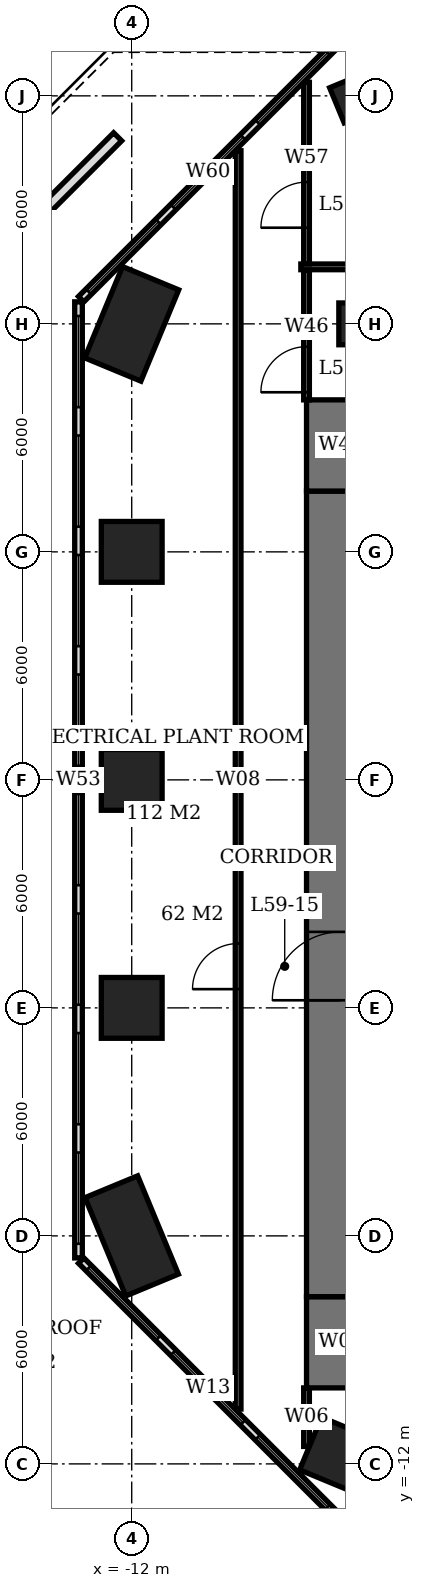
"""IFC4 building model, lengths in metres.
Left out: names, types, materials, properties, quantities, classifications, styles, units other than length and angle.
Written with IfcOpenShell. Run it as: python <this file> out.ifc"""

import sys

from ifc_helpers import new_model, si_unit, direction, frame, frame_2d, origin, origin_2d, place, context, subcontext, project, spatial, rectangle, extrude, element, fill, save


model = new_model("IFC4")
c1 = context("Model", 3, precision=1e-05, world=origin(), true_north=direction((0.0, 1.0)))
c2 = subcontext(c1, "Body", "Model", "MODEL_VIEW")
j1 = project(units=[si_unit("LENGTHUNIT", "METRE"), si_unit("PLANEANGLEUNIT", "RADIAN")], contexts=[c1])
p1 = place(None, origin())
s1 = spatial("IfcSite", under=j1, at=p1, CompositionType="ELEMENT")
p2 = place(p1, origin())
s2 = spatial("IfcBuilding", under=s1, at=p2, CompositionType="ELEMENT")
p3 = place(p2, frame((0.0, 0.0, 239.6)))
s3 = spatial("IfcBuildingStorey", under=s2, at=p3, CompositionType="ELEMENT", Elevation=239.6)
p4 = place(p3, frame((-12.0, -6.0, 0.0), z_axis=(0.0, 0.0, 1.0), x_axis=(-0.382683432365, 0.923879532511, 0.0)))
e1 = element("IfcColumn", 1, at=p4, inside=s3, PredefinedType="COLUMN", context=c2, shape_type="SweptSolid", body=[
    extrude(rectangle(XDim=2.8, YDim=1.5, at=origin_2d()), origin(), (0.0, 0.0, 1.0), 5.4),
])
for number, where, z_axis, x_axis in (
    (2, (-12.0, 0.0, 0.0), (0.0, 0.0, 1.0), (1.0, 0.0, 0.0)),
    (3, (-12.0, 6.0, 0.0), (0.0, 0.0, 1.0), (1.0, 0.0, 0.0)),
    (4, (-12.0, 12.0, 0.0), (0.0, 0.0, 1.0), (1.0, 0.0, 0.0)),
):
    element("IfcColumn", number, at=place(p3, frame(where, z_axis=z_axis, x_axis=x_axis)), inside=s3, PredefinedType="COLUMN", context=c2, shape_type="SweptSolid", body=[
        extrude(rectangle(XDim=1.6, YDim=1.6, at=origin_2d()), origin(), (0.0, 0.0, 1.0), 5.4),
    ])
p5 = place(p3, frame((-12.0, 18.0, 0.0), z_axis=(0.0, 0.0, 1.0), x_axis=(0.382683432365, 0.923879532511, 0.0)))
e5 = element("IfcColumn", 5, at=p5, inside=s3, PredefinedType="COLUMN", context=c2, shape_type="SweptSolid", body=[
    extrude(rectangle(XDim=2.6, YDim=1.6, at=origin_2d()), origin(), (0.0, 0.0, 1.0), 5.4),
])
p6 = place(p3, frame((-6.0, -12.0, 0.0), z_axis=(0.0, 0.0, 1.0), x_axis=(-0.923879532511, 0.382683432365, 0.0)))
e6 = element("IfcColumn", 6, at=p6, inside=s3, PredefinedType="COLUMN", context=c2, shape_type="SweptSolid", body=[
    extrude(rectangle(XDim=2.8, YDim=1.5, at=origin_2d()), origin(), (0.0, 0.0, 1.0), 5.4),
])
p7 = place(p3, frame((-6.0, 18.0, 0.0), z_axis=(0.0, 0.0, 1.0), x_axis=(1.0, 0.0, 0.0)))
e7 = element("IfcColumn", 7, at=p7, inside=s3, PredefinedType="COLUMN", context=c2, shape_type="SweptSolid", body=[
    extrude(rectangle(XDim=1.1, YDim=1.1, at=origin_2d()), origin(), (0.0, 0.0, 1.0), 5.4),
])
p8 = place(p3, frame((-6.0, 24.0, 0.0), z_axis=(0.0, 0.0, 1.0), x_axis=(0.923879532511, 0.382683432365, 0.0)))
e8 = element("IfcColumn", 8, at=p8, inside=s3, PredefinedType="COLUMN", context=c2, shape_type="SweptSolid", body=[
    extrude(rectangle(XDim=1.3, YDim=1.0, at=origin_2d()), origin(), (0.0, 0.0, 1.0), 5.4),
])
p9 = place(p3, frame((-6.5, -7.6, 0.0), z_axis=(0.0, 0.0, 1.0), x_axis=(0.0, 1.0, 0.0)))
e9 = element("IfcWall", 9, at=p9, inside=s3, PredefinedType="SHEAR", context=c2, shape_type="SweptSolid", body=[
    extrude(rectangle(XDim=21.2, YDim=1.8, at=frame_2d((10.6, 0.0))), origin(), (0.0, 0.0, 1.0), 5.4),
])
p10 = place(p9, frame((7.8, 0.0, 0.0)))
e10 = element("IfcOpeningElement", 10, at=p10, cuts=e9, PredefinedType="OPENING", context=c2, shape_type="SweptSolid", body=[
    extrude(rectangle(XDim=1.8, YDim=2.4, at=frame_2d((0.9, 1.2))), frame((0.0, 0.91, 0.0), z_axis=(0.0, -1.0, 0.0), x_axis=(1.0, 0.0, 0.0)), (0.0, 0.0, 1.0), 1.82),
])
for number, where, z_axis, x_axis in (
    (11, (-6.5, -10.0, 0.0), (0.0, 0.0, 1.0), (0.0, 1.0, 0.0)),
    (12, (-6.5, 13.6, 0.0), (0.0, 0.0, 1.0), (0.0, 1.0, 0.0)),
):
    element("IfcWall", number, at=place(p3, frame(where, z_axis=z_axis, x_axis=x_axis)), inside=s3, PredefinedType="SHEAR", context=c2, shape_type="SweptSolid", body=[
        extrude(rectangle(XDim=2.4, YDim=1.8, at=frame_2d((1.2, 0.0))), origin(), (0.0, 0.0, 1.0), 5.4),
    ])
p11 = place(p3, frame((-6.651, 25.329, 0.0), z_axis=(0.0, 0.0, 1.0), x_axis=(-0.707106781187, -0.707106781187, 0.0)))
e13 = element("IfcWall", 13, at=p11, inside=s3, PredefinedType="USERDEFINED", context=c2, shape_type="SweptSolid", body=[
    extrude(rectangle(XDim=9.445, YDim=0.2, at=frame_2d((4.723, 0.0))), origin(), (0.0, 0.0, 1.0), 5.4),
])
p12 = place(p11, frame((0.274, 0.0, 0.6)))
e14 = element("IfcOpeningElement", 14, at=p12, cuts=e13, PredefinedType="OPENING", context=c2, shape_type="SweptSolid", body=[
    extrude(rectangle(XDim=2.6, YDim=3.0, at=frame_2d((1.3, 1.5))), frame((0.0, 0.11, 0.0), z_axis=(0.0, -1.0, 0.0), x_axis=(1.0, 0.0, 0.0)), (0.0, 0.0, 1.0), 0.22),
])
p13 = place(p11, frame((3.423, 0.0, 0.6)))
e15 = element("IfcOpeningElement", 15, at=p13, cuts=e13, PredefinedType="OPENING", context=c2, shape_type="SweptSolid", body=[
    extrude(rectangle(XDim=2.6, YDim=3.0, at=frame_2d((1.3, 1.5))), frame((0.0, 0.11, 0.0), z_axis=(0.0, -1.0, 0.0), x_axis=(1.0, 0.0, 0.0)), (0.0, 0.0, 1.0), 0.22),
])
p14 = place(p11, frame((6.571, 0.0, 0.6)))
e16 = element("IfcOpeningElement", 16, at=p14, cuts=e13, PredefinedType="OPENING", context=c2, shape_type="SweptSolid", body=[
    extrude(rectangle(XDim=2.6, YDim=3.0, at=frame_2d((1.3, 1.5))), frame((0.0, 0.11, 0.0), z_axis=(0.0, -1.0, 0.0), x_axis=(1.0, 0.0, 0.0)), (0.0, 0.0, 1.0), 0.22),
])
p15 = place(p3, frame((-13.4, 18.58, 0.0), z_axis=(0.0, 0.0, 1.0), x_axis=(0.0, -1.0, 0.0)))
e17 = element("IfcWall", 17, at=p15, inside=s3, PredefinedType="USERDEFINED", context=c2, shape_type="SweptSolid", body=[
    extrude(rectangle(XDim=25.16, YDim=0.2, at=frame_2d((12.58, 0.0))), origin(), (0.0, 0.0, 1.0), 5.4),
])
p16 = place(p15, frame((0.373, 0.0, 0.6)))
e18 = element("IfcOpeningElement", 18, at=p16, cuts=e17, PredefinedType="OPENING", context=c2, shape_type="SweptSolid", body=[
    extrude(rectangle(XDim=2.4, YDim=3.0, at=frame_2d((1.2, 1.5))), frame((0.0, 0.11, 0.0), z_axis=(0.0, -1.0, 0.0), x_axis=(1.0, 0.0, 0.0)), (0.0, 0.0, 1.0), 0.22),
])
p17 = place(p15, frame((3.518, 0.0, 0.6)))
e19 = element("IfcOpeningElement", 19, at=p17, cuts=e17, PredefinedType="OPENING", context=c2, shape_type="SweptSolid", body=[
    extrude(rectangle(XDim=2.4, YDim=3.0, at=frame_2d((1.2, 1.5))), frame((0.0, 0.11, 0.0), z_axis=(0.0, -1.0, 0.0), x_axis=(1.0, 0.0, 0.0)), (0.0, 0.0, 1.0), 0.22),
])
p18 = place(p15, frame((6.662, 0.0, 0.6)))
e20 = element("IfcOpeningElement", 20, at=p18, cuts=e17, PredefinedType="OPENING", context=c2, shape_type="SweptSolid", body=[
    extrude(rectangle(XDim=2.4, YDim=3.0, at=frame_2d((1.2, 1.5))), frame((0.0, 0.11, 0.0), z_axis=(0.0, -1.0, 0.0), x_axis=(1.0, 0.0, 0.0)), (0.0, 0.0, 1.0), 0.22),
])
p19 = place(p15, frame((9.807, 0.0, 0.6)))
e21 = element("IfcOpeningElement", 21, at=p19, cuts=e17, PredefinedType="OPENING", context=c2, shape_type="SweptSolid", body=[
    extrude(rectangle(XDim=2.4, YDim=3.0, at=frame_2d((1.2, 1.5))), frame((0.0, 0.11, 0.0), z_axis=(0.0, -1.0, 0.0), x_axis=(1.0, 0.0, 0.0)), (0.0, 0.0, 1.0), 0.22),
])
p20 = place(p15, frame((12.952, 0.0, 0.6)))
e22 = element("IfcOpeningElement", 22, at=p20, cuts=e17, PredefinedType="OPENING", context=c2, shape_type="SweptSolid", body=[
    extrude(rectangle(XDim=2.4, YDim=3.0, at=frame_2d((1.2, 1.5))), frame((0.0, 0.11, 0.0), z_axis=(0.0, -1.0, 0.0), x_axis=(1.0, 0.0, 0.0)), (0.0, 0.0, 1.0), 0.22),
])
p21 = place(p15, frame((16.097, 0.0, 0.6)))
e23 = element("IfcOpeningElement", 23, at=p21, cuts=e17, PredefinedType="OPENING", context=c2, shape_type="SweptSolid", body=[
    extrude(rectangle(XDim=2.4, YDim=3.0, at=frame_2d((1.2, 1.5))), frame((0.0, 0.11, 0.0), z_axis=(0.0, -1.0, 0.0), x_axis=(1.0, 0.0, 0.0)), (0.0, 0.0, 1.0), 0.22),
])
p22 = place(p15, frame((19.242, 0.0, 0.6)))
e24 = element("IfcOpeningElement", 24, at=p22, cuts=e17, PredefinedType="OPENING", context=c2, shape_type="SweptSolid", body=[
    extrude(rectangle(XDim=2.4, YDim=3.0, at=frame_2d((1.2, 1.5))), frame((0.0, 0.11, 0.0), z_axis=(0.0, -1.0, 0.0), x_axis=(1.0, 0.0, 0.0)), (0.0, 0.0, 1.0), 0.22),
])
p23 = place(p15, frame((22.387, 0.0, 0.6)))
e25 = element("IfcOpeningElement", 25, at=p23, cuts=e17, PredefinedType="OPENING", context=c2, shape_type="SweptSolid", body=[
    extrude(rectangle(XDim=2.4, YDim=3.0, at=frame_2d((1.2, 1.5))), frame((0.0, 0.11, 0.0), z_axis=(0.0, -1.0, 0.0), x_axis=(1.0, 0.0, 0.0)), (0.0, 0.0, 1.0), 0.22),
])
p24 = place(p3, frame((-13.329, -6.651, 0.0), z_axis=(0.0, 0.0, 1.0), x_axis=(0.707106781187, -0.707106781187, 0.0)))
e26 = element("IfcWall", 26, at=p24, inside=s3, PredefinedType="USERDEFINED", context=c2, shape_type="SweptSolid", body=[
    extrude(rectangle(XDim=9.445, YDim=0.2, at=frame_2d((4.723, 0.0))), origin(), (0.0, 0.0, 1.0), 5.4),
])
p25 = place(p24, frame((0.274, 0.0, 0.6)))
e27 = element("IfcOpeningElement", 27, at=p25, cuts=e26, PredefinedType="OPENING", context=c2, shape_type="SweptSolid", body=[
    extrude(rectangle(XDim=2.6, YDim=3.0, at=frame_2d((1.3, 1.5))), frame((0.0, 0.11, 0.0), z_axis=(0.0, -1.0, 0.0), x_axis=(1.0, 0.0, 0.0)), (0.0, 0.0, 1.0), 0.22),
])
p26 = place(p24, frame((3.423, 0.0, 0.6)))
e28 = element("IfcOpeningElement", 28, at=p26, cuts=e26, PredefinedType="OPENING", context=c2, shape_type="SweptSolid", body=[
    extrude(rectangle(XDim=2.6, YDim=3.0, at=frame_2d((1.3, 1.5))), frame((0.0, 0.11, 0.0), z_axis=(0.0, -1.0, 0.0), x_axis=(1.0, 0.0, 0.0)), (0.0, 0.0, 1.0), 0.22),
])
p27 = place(p24, frame((6.571, 0.0, 0.6)))
e29 = element("IfcOpeningElement", 29, at=p27, cuts=e26, PredefinedType="OPENING", context=c2, shape_type="SweptSolid", body=[
    extrude(rectangle(XDim=2.6, YDim=3.0, at=frame_2d((1.3, 1.5))), frame((0.0, 0.11, 0.0), z_axis=(0.0, -1.0, 0.0), x_axis=(1.0, 0.0, 0.0)), (0.0, 0.0, 1.0), 0.22),
])
for number, where, z_axis, x_axis in (
    (30, (-12.37, -16.923, 0.0), (0.0, 0.0, 1.0), (-0.707, 0.707, 0.0)),
    (31, (-16.923, 18.37, 0.0), (0.0, 0.0, 1.0), (0.707, 0.707, 0.0)),
):
    element("IfcWall", number, at=place(p3, frame(where, z_axis=z_axis, x_axis=x_axis)), inside=s3, PredefinedType="USERDEFINED", context=c2, shape_type="SweptSolid", body=[
        extrude(rectangle(XDim=6.438, YDim=0.3, at=frame_2d((3.219, 0.0))), origin(), (0.0, 0.0, 1.0), 0.6),
    ])
p28 = place(p3, frame((-9.2, -10.556, 0.0), z_axis=(0.0, 0.0, 1.0), x_axis=(0.0, 1.0, 0.0)))
e32 = element("IfcWall", 32, at=p28, inside=s3, PredefinedType="PARTITIONING", context=c2, shape_type="SweptSolid", body=[
    extrude(rectangle(XDim=33.112, YDim=0.15, at=frame_2d((16.556, 0.0))), origin(), (0.0, 0.0, 1.0), 5.15),
])
p29 = place(p28, frame((11.049, 0.0, 0.0)))
e33 = element("IfcOpeningElement", 33, at=p29, cuts=e32, PredefinedType="OPENING", context=c2, shape_type="SweptSolid", body=[
    extrude(rectangle(XDim=1.2, YDim=2.4, at=frame_2d((0.6, 1.2))), frame((0.0, 0.085, 0.0), z_axis=(0.0, -1.0, 0.0), x_axis=(1.0, 0.0, 0.0)), (0.0, 0.0, 1.0), 0.17),
])
p30 = place(p3, frame((-7.4, -11.541, 0.0), z_axis=(0.0, 0.0, 1.0), x_axis=(0.0, 1.0, 0.0)))
e34 = element("IfcWall", 34, at=p30, inside=s3, PredefinedType="PARTITIONING", context=c2, shape_type="SweptSolid", body=[
    extrude(rectangle(XDim=1.541, YDim=0.15, at=frame_2d((0.77, 0.0))), origin(), (0.0, 0.0, 1.0), 5.15),
])
p31 = place(p3, frame((-7.4, 16.0, 0.0), z_axis=(0.0, 0.0, 1.0), x_axis=(0.0, 1.0, 0.0)))
e35 = element("IfcWall", 35, at=p31, inside=s3, PredefinedType="PARTITIONING", context=c2, shape_type="SweptSolid", body=[
    extrude(rectangle(XDim=3.425, YDim=0.15, at=frame_2d((1.712, 0.0))), origin(), (0.0, 0.0, 1.0), 5.15),
])
p32 = place(p31, frame((0.2, 0.0, 0.0)))
e36 = element("IfcOpeningElement", 36, at=p32, cuts=e35, PredefinedType="OPENING", context=c2, shape_type="SweptSolid", body=[
    extrude(rectangle(XDim=1.2, YDim=2.4, at=frame_2d((0.6, 1.2))), frame((0.0, 0.085, 0.0), z_axis=(0.0, -1.0, 0.0), x_axis=(1.0, 0.0, 0.0)), (0.0, 0.0, 1.0), 0.17),
])
p33 = place(p3, frame((-7.4, 19.575, 0.0), z_axis=(0.0, 0.0, 1.0), x_axis=(0.0, 1.0, 0.0)))
e37 = element("IfcWall", 37, at=p33, inside=s3, PredefinedType="PARTITIONING", context=c2, shape_type="SweptSolid", body=[
    extrude(rectangle(XDim=4.781, YDim=0.15, at=frame_2d((2.391, 0.0))), origin(), (0.0, 0.0, 1.0), 5.15),
])
p34 = place(p33, frame((0.955, 0.0, 0.0)))
e38 = element("IfcOpeningElement", 38, at=p34, cuts=e37, PredefinedType="OPENING", context=c2, shape_type="SweptSolid", body=[
    extrude(rectangle(XDim=1.2, YDim=2.4, at=frame_2d((0.6, 1.2))), frame((0.0, 0.085, 0.0), z_axis=(0.0, -1.0, 0.0), x_axis=(1.0, 0.0, 0.0)), (0.0, 0.0, 1.0), 0.17),
])
p35 = place(p3, frame((-7.55, 19.5, 0.0), z_axis=(0.0, 0.0, 1.0), x_axis=(1.0, 0.0, 0.0)))
e39 = element("IfcWall", 39, at=p35, inside=s3, PredefinedType="PARTITIONING", context=c2, shape_type="SweptSolid", body=[
    extrude(rectangle(XDim=12.05, YDim=0.15, at=frame_2d((6.025, 0.0))), origin(), (0.0, 0.0, 1.0), 5.15),
])
p36 = place(p12, origin())
e40 = element("IfcWindow", 40, at=p36, inside=s3, PartitioningType="SINGLE_PANEL", PredefinedType="USERDEFINED", context=c2, shape_type="SweptSolid", body=[
    extrude(rectangle(XDim=2.6, YDim=3.0, at=frame_2d((1.3, 1.5))), frame((0.0, 0.03, 0.0), z_axis=(0.0, -1.0, 0.0), x_axis=(1.0, 0.0, 0.0)), (0.0, 0.0, 1.0), 0.06),
])
fill(e14, e40)
p37 = place(p13, origin())
e41 = element("IfcWindow", 41, at=p37, inside=s3, PartitioningType="SINGLE_PANEL", PredefinedType="USERDEFINED", context=c2, shape_type="SweptSolid", body=[
    extrude(rectangle(XDim=2.6, YDim=3.0, at=frame_2d((1.3, 1.5))), frame((0.0, 0.03, 0.0), z_axis=(0.0, -1.0, 0.0), x_axis=(1.0, 0.0, 0.0)), (0.0, 0.0, 1.0), 0.06),
])
fill(e15, e41)
p38 = place(p14, origin())
e42 = element("IfcWindow", 42, at=p38, inside=s3, PartitioningType="SINGLE_PANEL", PredefinedType="USERDEFINED", context=c2, shape_type="SweptSolid", body=[
    extrude(rectangle(XDim=2.6, YDim=3.0, at=frame_2d((1.3, 1.5))), frame((0.0, 0.03, 0.0), z_axis=(0.0, -1.0, 0.0), x_axis=(1.0, 0.0, 0.0)), (0.0, 0.0, 1.0), 0.06),
])
fill(e16, e42)
p39 = place(p16, origin())
e43 = element("IfcWindow", 43, at=p39, inside=s3, PartitioningType="SINGLE_PANEL", PredefinedType="USERDEFINED", context=c2, shape_type="SweptSolid", body=[
    extrude(rectangle(XDim=2.4, YDim=3.0, at=frame_2d((1.2, 1.5))), frame((0.0, 0.03, 0.0), z_axis=(0.0, -1.0, 0.0), x_axis=(1.0, 0.0, 0.0)), (0.0, 0.0, 1.0), 0.06),
])
fill(e18, e43)
p40 = place(p17, origin())
e44 = element("IfcWindow", 44, at=p40, inside=s3, PartitioningType="SINGLE_PANEL", PredefinedType="USERDEFINED", context=c2, shape_type="SweptSolid", body=[
    extrude(rectangle(XDim=2.4, YDim=3.0, at=frame_2d((1.2, 1.5))), frame((0.0, 0.03, 0.0), z_axis=(0.0, -1.0, 0.0), x_axis=(1.0, 0.0, 0.0)), (0.0, 0.0, 1.0), 0.06),
])
fill(e19, e44)
p41 = place(p18, origin())
e45 = element("IfcWindow", 45, at=p41, inside=s3, PartitioningType="SINGLE_PANEL", PredefinedType="USERDEFINED", context=c2, shape_type="SweptSolid", body=[
    extrude(rectangle(XDim=2.4, YDim=3.0, at=frame_2d((1.2, 1.5))), frame((0.0, 0.03, 0.0), z_axis=(0.0, -1.0, 0.0), x_axis=(1.0, 0.0, 0.0)), (0.0, 0.0, 1.0), 0.06),
])
fill(e20, e45)
p42 = place(p19, origin())
e46 = element("IfcWindow", 46, at=p42, inside=s3, PartitioningType="SINGLE_PANEL", PredefinedType="USERDEFINED", context=c2, shape_type="SweptSolid", body=[
    extrude(rectangle(XDim=2.4, YDim=3.0, at=frame_2d((1.2, 1.5))), frame((0.0, 0.03, 0.0), z_axis=(0.0, -1.0, 0.0), x_axis=(1.0, 0.0, 0.0)), (0.0, 0.0, 1.0), 0.06),
])
fill(e21, e46)
p43 = place(p20, origin())
e47 = element("IfcWindow", 47, at=p43, inside=s3, PartitioningType="SINGLE_PANEL", PredefinedType="USERDEFINED", context=c2, shape_type="SweptSolid", body=[
    extrude(rectangle(XDim=2.4, YDim=3.0, at=frame_2d((1.2, 1.5))), frame((0.0, 0.03, 0.0), z_axis=(0.0, -1.0, 0.0), x_axis=(1.0, 0.0, 0.0)), (0.0, 0.0, 1.0), 0.06),
])
fill(e22, e47)
p44 = place(p21, origin())
e48 = element("IfcWindow", 48, at=p44, inside=s3, PartitioningType="SINGLE_PANEL", PredefinedType="USERDEFINED", context=c2, shape_type="SweptSolid", body=[
    extrude(rectangle(XDim=2.4, YDim=3.0, at=frame_2d((1.2, 1.5))), frame((0.0, 0.03, 0.0), z_axis=(0.0, -1.0, 0.0), x_axis=(1.0, 0.0, 0.0)), (0.0, 0.0, 1.0), 0.06),
])
fill(e23, e48)
p45 = place(p22, origin())
e49 = element("IfcWindow", 49, at=p45, inside=s3, PartitioningType="SINGLE_PANEL", PredefinedType="USERDEFINED", context=c2, shape_type="SweptSolid", body=[
    extrude(rectangle(XDim=2.4, YDim=3.0, at=frame_2d((1.2, 1.5))), frame((0.0, 0.03, 0.0), z_axis=(0.0, -1.0, 0.0), x_axis=(1.0, 0.0, 0.0)), (0.0, 0.0, 1.0), 0.06),
])
fill(e24, e49)
p46 = place(p23, origin())
e50 = element("IfcWindow", 50, at=p46, inside=s3, PartitioningType="SINGLE_PANEL", PredefinedType="USERDEFINED", context=c2, shape_type="SweptSolid", body=[
    extrude(rectangle(XDim=2.4, YDim=3.0, at=frame_2d((1.2, 1.5))), frame((0.0, 0.03, 0.0), z_axis=(0.0, -1.0, 0.0), x_axis=(1.0, 0.0, 0.0)), (0.0, 0.0, 1.0), 0.06),
])
fill(e25, e50)
p47 = place(p25, origin())
e51 = element("IfcWindow", 51, at=p47, inside=s3, PartitioningType="SINGLE_PANEL", PredefinedType="USERDEFINED", context=c2, shape_type="SweptSolid", body=[
    extrude(rectangle(XDim=2.6, YDim=3.0, at=frame_2d((1.3, 1.5))), frame((0.0, 0.03, 0.0), z_axis=(0.0, -1.0, 0.0), x_axis=(1.0, 0.0, 0.0)), (0.0, 0.0, 1.0), 0.06),
])
fill(e27, e51)
p48 = place(p26, origin())
e52 = element("IfcWindow", 52, at=p48, inside=s3, PartitioningType="SINGLE_PANEL", PredefinedType="USERDEFINED", context=c2, shape_type="SweptSolid", body=[
    extrude(rectangle(XDim=2.6, YDim=3.0, at=frame_2d((1.3, 1.5))), frame((0.0, 0.03, 0.0), z_axis=(0.0, -1.0, 0.0), x_axis=(1.0, 0.0, 0.0)), (0.0, 0.0, 1.0), 0.06),
])
fill(e28, e52)
p49 = place(p27, origin())
e53 = element("IfcWindow", 53, at=p49, inside=s3, PartitioningType="SINGLE_PANEL", PredefinedType="USERDEFINED", context=c2, shape_type="SweptSolid", body=[
    extrude(rectangle(XDim=2.6, YDim=3.0, at=frame_2d((1.3, 1.5))), frame((0.0, 0.03, 0.0), z_axis=(0.0, -1.0, 0.0), x_axis=(1.0, 0.0, 0.0)), (0.0, 0.0, 1.0), 0.06),
])
fill(e29, e53)
p50 = place(p10, origin())
e54 = element("IfcDoor", 54, at=p50, inside=s3, OperationType="DOUBLE_DOOR_SINGLE_SWING", PredefinedType="DOOR", context=c2, shape_type="SweptSolid", body=[
    extrude(rectangle(XDim=1.8, YDim=2.4, at=frame_2d((0.9, 1.2))), frame((0.0, 0.025, 0.0), z_axis=(0.0, -1.0, 0.0), x_axis=(1.0, 0.0, 0.0)), (0.0, 0.0, 1.0), 0.05),
])
fill(e10, e54)
p51 = place(p29, origin())
e55 = element("IfcDoor", 55, at=p51, inside=s3, OperationType="SINGLE_SWING_LEFT", PredefinedType="DOOR", context=c2, shape_type="SweptSolid", body=[
    extrude(rectangle(XDim=1.2, YDim=2.4, at=frame_2d((0.6, 1.2))), frame((0.0, 0.025, 0.0), z_axis=(0.0, -1.0, 0.0), x_axis=(1.0, 0.0, 0.0)), (0.0, 0.0, 1.0), 0.05),
])
fill(e33, e55)
p52 = place(p34, origin())
e56 = element("IfcDoor", 56, at=p52, inside=s3, OperationType="SINGLE_SWING_LEFT", PredefinedType="DOOR", context=c2, shape_type="SweptSolid", body=[
    extrude(rectangle(XDim=1.2, YDim=2.4, at=frame_2d((0.6, 1.2))), frame((0.0, 0.025, 0.0), z_axis=(0.0, -1.0, 0.0), x_axis=(1.0, 0.0, 0.0)), (0.0, 0.0, 1.0), 0.05),
])
fill(e38, e56)
p53 = place(p32, origin())
e57 = element("IfcDoor", 57, at=p53, inside=s3, OperationType="SINGLE_SWING_LEFT", PredefinedType="DOOR", context=c2, shape_type="SweptSolid", body=[
    extrude(rectangle(XDim=1.2, YDim=2.4, at=frame_2d((0.6, 1.2))), frame((0.0, 0.025, 0.0), z_axis=(0.0, -1.0, 0.0), x_axis=(1.0, 0.0, 0.0)), (0.0, 0.0, 1.0), 0.05),
])
fill(e36, e57)
save(model, sys.argv[1])
